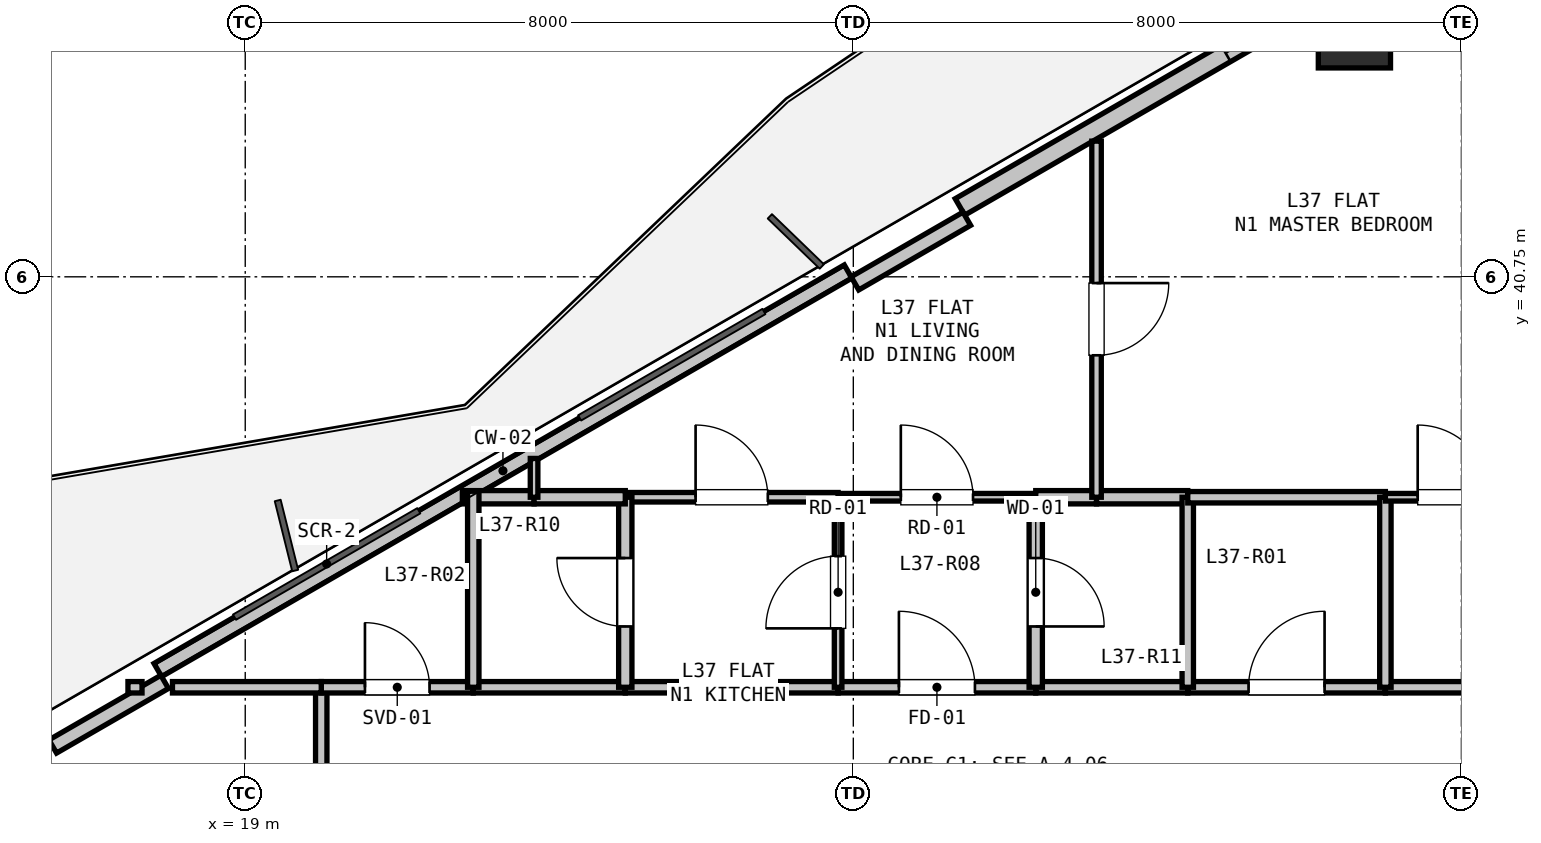
"""IFC4 building model, lengths in metres.
Left out: names, types, materials, properties, quantities, classifications, styles, units other than length and angle.
Written with IfcOpenShell. Run it as: python <this file> out.ifc"""

import sys

from ifc_helpers import new_model, si_unit, direction, frame, frame_2d, origin, origin_2d, place, context, subcontext, project, spatial, rectangle, hollow_rectangle, extrude, element, fill, save


model = new_model("IFC4")
c1 = context("Model", 3, precision=1e-05, world=origin(), true_north=direction((0.0, 1.0)))
c2 = subcontext(c1, "Body", "Model", "MODEL_VIEW")
j1 = project(units=[si_unit("LENGTHUNIT", "METRE"), si_unit("PLANEANGLEUNIT", "RADIAN")], contexts=[c1])
p1 = place(None, origin())
s1 = spatial("IfcSite", under=j1, at=p1, CompositionType="ELEMENT")
p2 = place(p1, origin())
s2 = spatial("IfcBuilding", under=s1, at=p2, CompositionType="ELEMENT")
p3 = place(p2, frame((0.0, 0.0, 134.4)))
s3 = spatial("IfcBuildingStorey", under=s2, at=p3, CompositionType="ELEMENT", Elevation=134.4)
p4 = place(p3, frame((33.593, 43.973, 0.0), z_axis=(0.0, 0.0, 1.0), x_axis=(1.0, 0.0, 0.0)))
e1 = element("IfcColumn", 1, at=p4, inside=s3, PredefinedType="COLUMN", context=c2, shape_type="SweptSolid", body=[
    extrude(hollow_rectangle(XDim=0.95, YDim=0.95, WallThickness=0.028, at=origin_2d()), origin(), (0.0, 0.0, 1.0), 3.3),
])
p5 = place(p3, frame((17.85, 35.577, 0.0), z_axis=(0.0, 0.0, 1.0), x_axis=(0.866026619769, 0.499997893847, 0.0)))
e2 = element("IfcWall", 2, at=p5, inside=s3, PredefinedType="PARAPET", context=c2, shape_type="SweptSolid", body=[
    extrude(rectangle(XDim=10.486, YDim=0.2, at=frame_2d((5.243, 0.0))), origin(), (0.0, 0.0, 1.0), 0.2),
])
p6 = place(p3, frame((28.403, 41.67, 0.0), z_axis=(0.0, 0.0, 1.0), x_axis=(0.86602239209, 0.500005216371, 0.0)))
e3 = element("IfcWall", 3, at=p6, inside=s3, PredefinedType="SOLIDWALL", context=c2, shape_type="SweptSolid", body=[
    extrude(rectangle(XDim=11.186, YDim=0.25, at=frame_2d((5.593, 0.0))), origin(), (0.0, 0.0, 1.0), 2.68),
])
p7 = place(p6, frame((4.039, 0.0, 0.9)))
e4 = element("IfcOpeningElement", 4, at=p7, cuts=e3, PredefinedType="OPENING", context=c2, shape_type="SweptSolid", body=[
    extrude(rectangle(XDim=1.2, YDim=1.4, at=frame_2d((0.6, 0.7))), frame((0.0, 0.135, 0.0), z_axis=(0.0, -1.0, 0.0), x_axis=(1.0, 0.0, 0.0)), (0.0, 0.0, 1.0), 0.27),
])
for number, where, z_axis, x_axis in (
    (5, (16.468, 34.571, 0.0), (0.0, 0.0, 1.0), (0.866, 0.5, 0.0)),
    (6, (27.021, 40.664, 0.0), (0.0, 0.0, 1.0), (0.866, 0.5, 0.0)),
):
    element("IfcWall", number, at=place(p3, frame(where, z_axis=z_axis, x_axis=x_axis)), inside=s3, PredefinedType="PARAPET", context=c2, shape_type="SweptSolid", body=[
        extrude(rectangle(XDim=1.7, YDim=0.2, at=frame_2d((0.85, 0.0))), origin(), (0.0, 0.0, 1.0), 2.68),
    ])
p8 = place(p3, frame((20.0, 32.75, 0.0), z_axis=(0.0, 0.0, 1.0), x_axis=(0.0, 1.0, 0.0)))
e7 = element("IfcWall", 7, at=p8, inside=s3, PredefinedType="PARTITIONING", context=c2, shape_type="SweptSolid", body=[
    extrude(rectangle(XDim=2.6, YDim=0.15, at=frame_2d((1.3, 0.0))), origin(), (0.0, 0.0, 1.0), 2.433),
])
p9 = place(p3, frame((20.0, 35.35, 0.0), z_axis=(0.0, 0.0, 1.0), x_axis=(1.0, 0.0, 0.0)))
e8 = element("IfcWall", 8, at=p9, inside=s3, PredefinedType="PARTITIONING", context=c2, shape_type="SweptSolid", body=[
    extrude(rectangle(XDim=2.0, YDim=0.15, at=frame_2d((1.0, 0.0))), origin(), (0.0, 0.0, 1.0), 3.06),
])
p10 = place(p9, frame((0.575, 0.0, 0.0)))
e9 = element("IfcOpeningElement", 9, at=p10, cuts=e8, PredefinedType="OPENING", context=c2, shape_type="SweptSolid", body=[
    extrude(rectangle(XDim=0.85, YDim=2.1, at=frame_2d((0.425, 1.05))), frame((0.0, 0.085, 0.0), z_axis=(0.0, -1.0, 0.0), x_axis=(1.0, 0.0, 0.0)), (0.0, 0.0, 1.0), 0.17),
])
p11 = place(p3, frame((22.0, 35.35, 0.0), z_axis=(0.0, 0.0, 1.0), x_axis=(1.0, 0.0, 0.0)))
e10 = element("IfcWall", 10, at=p11, inside=s3, PredefinedType="PARTITIONING", context=c2, shape_type="SweptSolid", body=[
    extrude(rectangle(XDim=2.0, YDim=0.15, at=frame_2d((1.0, 0.0))), origin(), (0.0, 0.0, 1.0), 3.06),
])
p12 = place(p3, frame((24.0, 35.35, 0.0), z_axis=(0.0, 0.0, 1.0), x_axis=(1.0, 0.0, 0.0)))
e11 = element("IfcWall", 11, at=p12, inside=s3, PredefinedType="PARTITIONING", context=c2, shape_type="SweptSolid", body=[
    extrude(rectangle(XDim=2.8, YDim=0.15, at=frame_2d((1.4, 0.0))), origin(), (0.0, 0.0, 1.0), 3.06),
])
p13 = place(p3, frame((26.8, 35.35, 0.0), z_axis=(0.0, 0.0, 1.0), x_axis=(1.0, 0.0, 0.0)))
e12 = element("IfcWall", 12, at=p13, inside=s3, PredefinedType="PARTITIONING", context=c2, shape_type="SweptSolid", body=[
    extrude(rectangle(XDim=2.6, YDim=0.15, at=frame_2d((1.3, 0.0))), origin(), (0.0, 0.0, 1.0), 3.06),
])
p14 = place(p13, frame((0.8, 0.0, 0.0)))
e13 = element("IfcOpeningElement", 13, at=p14, cuts=e12, PredefinedType="OPENING", context=c2, shape_type="SweptSolid", body=[
    extrude(rectangle(XDim=1.0, YDim=2.15, at=frame_2d((0.5, 1.075))), frame((0.0, 0.085, 0.0), z_axis=(0.0, -1.0, 0.0), x_axis=(1.0, 0.0, 0.0)), (0.0, 0.0, 1.0), 0.17),
])
p15 = place(p3, frame((29.4, 35.35, 0.0), z_axis=(0.0, 0.0, 1.0), x_axis=(1.0, 0.0, 0.0)))
e14 = element("IfcWall", 14, at=p15, inside=s3, PredefinedType="PARTITIONING", context=c2, shape_type="SweptSolid", body=[
    extrude(rectangle(XDim=2.0, YDim=0.15, at=frame_2d((1.0, 0.0))), origin(), (0.0, 0.0, 1.0), 3.06),
])
p16 = place(p3, frame((31.4, 35.35, 0.0), z_axis=(0.0, 0.0, 1.0), x_axis=(1.0, 0.0, 0.0)))
e15 = element("IfcWall", 15, at=p16, inside=s3, PredefinedType="PARTITIONING", context=c2, shape_type="SweptSolid", body=[
    extrude(rectangle(XDim=2.6, YDim=0.15, at=frame_2d((1.3, 0.0))), origin(), (0.0, 0.0, 1.0), 3.06),
])
p17 = place(p16, frame((0.8, 0.0, 0.0)))
e16 = element("IfcOpeningElement", 16, at=p17, cuts=e15, PredefinedType="OPENING", context=c2, shape_type="SweptSolid", body=[
    extrude(rectangle(XDim=1.0, YDim=2.15, at=frame_2d((0.5, 1.075))), frame((0.0, 0.085, 0.0), z_axis=(0.0, -1.0, 0.0), x_axis=(1.0, 0.0, 0.0)), (0.0, 0.0, 1.0), 0.17),
])
p18 = place(p3, frame((34.0, 35.35, 0.0), z_axis=(0.0, 0.0, 1.0), x_axis=(1.0, 0.0, 0.0)))
e17 = element("IfcWall", 17, at=p18, inside=s3, PredefinedType="PARTITIONING", context=c2, shape_type="SweptSolid", body=[
    extrude(rectangle(XDim=5.2, YDim=0.15, at=frame_2d((2.6, 0.0))), origin(), (0.0, 0.0, 1.0), 2.433),
])
p19 = place(p3, frame((26.8, 37.85, 0.0), z_axis=(0.0, 0.0, 1.0), x_axis=(1.0, 0.0, 0.0)))
e18 = element("IfcWall", 18, at=p19, inside=s3, PredefinedType="PARTITIONING", context=c2, shape_type="SweptSolid", body=[
    extrude(rectangle(XDim=2.6, YDim=0.1, at=frame_2d((1.3, 0.0))), origin(), (0.0, 0.0, 1.0), 3.06),
])
p20 = place(p19, frame((0.825, 0.0, 0.0)))
e19 = element("IfcOpeningElement", 19, at=p20, cuts=e18, PredefinedType="OPENING", context=c2, shape_type="SweptSolid", body=[
    extrude(rectangle(XDim=0.95, YDim=2.1, at=frame_2d((0.475, 1.05))), frame((0.0, 0.06, 0.0), z_axis=(0.0, -1.0, 0.0), x_axis=(1.0, 0.0, 0.0)), (0.0, 0.0, 1.0), 0.12),
])
p21 = place(p3, frame((29.4, 37.85, 0.0), z_axis=(0.0, 0.0, 1.0), x_axis=(0.0, -1.0, 0.0)))
e20 = element("IfcWall", 20, at=p21, inside=s3, PredefinedType="PLUMBINGWALL", context=c2, shape_type="SweptSolid", body=[
    extrude(rectangle(XDim=2.5, YDim=0.175, at=frame_2d((1.25, 0.0))), origin(), (0.0, 0.0, 1.0), 3.06),
])
p22 = place(p21, frame((0.8, 0.0, 0.0)))
e21 = element("IfcOpeningElement", 21, at=p22, cuts=e20, PredefinedType="OPENING", context=c2, shape_type="SweptSolid", body=[
    extrude(rectangle(XDim=0.9, YDim=2.1, at=frame_2d((0.45, 1.05))), frame((0.0, 0.097, 0.0), z_axis=(0.0, -1.0, 0.0), x_axis=(1.0, 0.0, 0.0)), (0.0, 0.0, 1.0), 0.195),
])
p23 = place(p3, frame((26.8, 35.35, 0.0), z_axis=(0.0, 0.0, 1.0), x_axis=(0.0, 1.0, 0.0)))
e22 = element("IfcWall", 22, at=p23, inside=s3, PredefinedType="PARTITIONING", context=c2, shape_type="SweptSolid", body=[
    extrude(rectangle(XDim=2.5, YDim=0.1, at=frame_2d((1.25, 0.0))), origin(), (0.0, 0.0, 1.0), 3.06),
])
p24 = place(p23, frame((0.775, 0.0, 0.0)))
e23 = element("IfcOpeningElement", 23, at=p24, cuts=e22, PredefinedType="OPENING", context=c2, shape_type="SweptSolid", body=[
    extrude(rectangle(XDim=0.95, YDim=2.1, at=frame_2d((0.475, 1.05))), frame((0.0, 0.06, 0.0), z_axis=(0.0, -1.0, 0.0), x_axis=(1.0, 0.0, 0.0)), (0.0, 0.0, 1.0), 0.12),
])
p25 = place(p3, frame((24.0, 37.85, 0.0), z_axis=(0.0, 0.0, 1.0), x_axis=(1.0, 0.0, 0.0)))
e24 = element("IfcWall", 24, at=p25, inside=s3, PredefinedType="PARTITIONING", context=c2, shape_type="SweptSolid", body=[
    extrude(rectangle(XDim=2.8, YDim=0.125, at=frame_2d((1.4, 0.0))), origin(), (0.0, 0.0, 1.0), 3.06),
])
p26 = place(p25, frame((0.925, 0.0, 0.0)))
e25 = element("IfcOpeningElement", 25, at=p26, cuts=e24, PredefinedType="OPENING", context=c2, shape_type="SweptSolid", body=[
    extrude(rectangle(XDim=0.95, YDim=2.1, at=frame_2d((0.475, 1.05))), frame((0.0, 0.073, 0.0), z_axis=(0.0, -1.0, 0.0), x_axis=(1.0, 0.0, 0.0)), (0.0, 0.0, 1.0), 0.145),
])
p27 = place(p3, frame((24.0, 35.35, 0.0), z_axis=(0.0, 0.0, 1.0), x_axis=(0.0, 1.0, 0.0)))
e26 = element("IfcWall", 26, at=p27, inside=s3, PredefinedType="PLUMBINGWALL", context=c2, shape_type="SweptSolid", body=[
    extrude(rectangle(XDim=2.5, YDim=0.175, at=frame_2d((1.25, 0.0))), origin(), (0.0, 0.0, 1.0), 3.06),
])
p28 = place(p27, frame((0.8, 0.0, 0.0)))
e27 = element("IfcOpeningElement", 27, at=p28, cuts=e26, PredefinedType="OPENING", context=c2, shape_type="SweptSolid", body=[
    extrude(rectangle(XDim=0.9, YDim=2.1, at=frame_2d((0.45, 1.05))), frame((0.0, 0.097, 0.0), z_axis=(0.0, -1.0, 0.0), x_axis=(1.0, 0.0, 0.0)), (0.0, 0.0, 1.0), 0.195),
])
p29 = place(p3, frame((21.856, 37.85, 0.0), z_axis=(0.0, 0.0, 1.0), x_axis=(1.0, 0.0, 0.0)))
e28 = element("IfcWall", 28, at=p29, inside=s3, PredefinedType="PLUMBINGWALL", context=c2, shape_type="SweptSolid", body=[
    extrude(rectangle(XDim=0.944, YDim=0.175, at=frame_2d((0.472, 0.0))), origin(), (0.0, 0.0, 1.0), 2.365),
])
p30 = place(p3, frame((22.8, 37.85, 0.0), z_axis=(0.0, 0.0, 1.0), x_axis=(1.0, 0.0, 0.0)))
e29 = element("IfcWall", 29, at=p30, inside=s3, PredefinedType="PLUMBINGWALL", context=c2, shape_type="SweptSolid", body=[
    extrude(rectangle(XDim=1.2, YDim=0.175, at=frame_2d((0.6, 0.0))), origin(), (0.0, 0.0, 1.0), 2.365),
])
p31 = place(p3, frame((22.0, 35.35, 0.0), z_axis=(0.0, 0.0, 1.0), x_axis=(0.0, 1.0, 0.0)))
e30 = element("IfcWall", 30, at=p31, inside=s3, PredefinedType="PARTITIONING", context=c2, shape_type="SweptSolid", body=[
    extrude(rectangle(XDim=2.579, YDim=0.15, at=frame_2d((1.29, 0.0))), origin(), (0.0, 0.0, 1.0), 2.365),
])
p32 = place(p3, frame((29.4, 37.85, 0.0), z_axis=(0.0, 0.0, 1.0), x_axis=(1.0, 0.0, 0.0)))
e31 = element("IfcWall", 31, at=p32, inside=s3, PredefinedType="PLUMBINGWALL", context=c2, shape_type="SweptSolid", body=[
    extrude(rectangle(XDim=0.8, YDim=0.175, at=frame_2d((0.4, 0.0))), origin(), (0.0, 0.0, 1.0), 3.06),
])
p33 = place(p3, frame((30.2, 37.85, 0.0), z_axis=(0.0, 0.0, 1.0), x_axis=(1.0, 0.0, 0.0)))
e32 = element("IfcWall", 32, at=p33, inside=s3, PredefinedType="PLUMBINGWALL", context=c2, shape_type="SweptSolid", body=[
    extrude(rectangle(XDim=1.2, YDim=0.175, at=frame_2d((0.6, 0.0))), origin(), (0.0, 0.0, 1.0), 3.06),
])
p34 = place(p3, frame((31.4, 37.85, 0.0), z_axis=(0.0, 0.0, 1.0), x_axis=(0.0, -1.0, 0.0)))
e33 = element("IfcWall", 33, at=p34, inside=s3, PredefinedType="PARTITIONING", context=c2, shape_type="SweptSolid", body=[
    extrude(rectangle(XDim=2.5, YDim=0.15, at=frame_2d((1.25, 0.0))), origin(), (0.0, 0.0, 1.0), 3.06),
])
p35 = place(p3, frame((31.4, 37.85, 0.0), z_axis=(0.0, 0.0, 1.0), x_axis=(1.0, 0.0, 0.0)))
e34 = element("IfcWall", 34, at=p35, inside=s3, PredefinedType="PARTITIONING", context=c2, shape_type="SweptSolid", body=[
    extrude(rectangle(XDim=2.6, YDim=0.15, at=frame_2d((1.3, 0.0))), origin(), (0.0, 0.0, 1.0), 3.06),
])
p36 = place(p3, frame((34.0, 37.85, 0.0), z_axis=(0.0, 0.0, 1.0), x_axis=(0.0, -1.0, 0.0)))
e35 = element("IfcWall", 35, at=p36, inside=s3, PredefinedType="PARTITIONING", context=c2, shape_type="SweptSolid", body=[
    extrude(rectangle(XDim=2.5, YDim=0.15, at=frame_2d((1.25, 0.0))), origin(), (0.0, 0.0, 1.0), 3.06),
])
p37 = place(p3, frame((20.0, 35.35, 0.0), z_axis=(0.0, 0.0, 1.0), x_axis=(-1.0, 0.0, 0.0)))
e36 = element("IfcWall", 36, at=p37, inside=s3, PredefinedType="PARTITIONING", context=c2, shape_type="SweptSolid", body=[
    extrude(rectangle(XDim=1.958, YDim=0.15, at=frame_2d((0.979, 0.0))), origin(), (0.0, 0.0, 1.0), 2.365),
])
p38 = place(p3, frame((17.642, 35.35, 0.0), z_axis=(0.0, 0.0, 1.0), x_axis=(-1.0, 0.0, 0.0)))
e37 = element("IfcWall", 37, at=p38, inside=s3, PredefinedType="PARTITIONING", context=c2, shape_type="SweptSolid", body=[
    extrude(rectangle(XDim=0.185, YDim=0.15, at=frame_2d((0.093, 0.0))), origin(), (0.0, 0.0, 1.0), 3.06),
])
p39 = place(p3, frame((34.0, 37.85, 0.0), z_axis=(0.0, 0.0, 1.0), x_axis=(1.0, 0.0, 0.0)))
e38 = element("IfcWall", 38, at=p39, inside=s3, PredefinedType="PARTITIONING", context=c2, shape_type="SweptSolid", body=[
    extrude(rectangle(XDim=1.8, YDim=0.1, at=frame_2d((0.9, 0.0))), origin(), (0.0, 0.0, 1.0), 3.06),
])
p40 = place(p39, frame((0.425, 0.0, 0.0)))
e39 = element("IfcOpeningElement", 39, at=p40, cuts=e38, PredefinedType="OPENING", context=c2, shape_type="SweptSolid", body=[
    extrude(rectangle(XDim=0.95, YDim=2.1, at=frame_2d((0.475, 1.05))), frame((0.0, 0.06, 0.0), z_axis=(0.0, -1.0, 0.0), x_axis=(1.0, 0.0, 0.0)), (0.0, 0.0, 1.0), 0.12),
])
p41 = place(p3, frame((22.8, 37.85, 0.0), z_axis=(0.0, 0.0, 1.0), x_axis=(0.0, 1.0, 0.0)))
e40 = element("IfcWall", 40, at=p41, inside=s3, PredefinedType="PARTITIONING", context=c2, shape_type="SweptSolid", body=[
    extrude(rectangle(XDim=0.51, YDim=0.1, at=frame_2d((0.255, 0.0))), origin(), (0.0, 0.0, 1.0), 2.725),
])
p42 = place(p3, frame((30.2, 42.535, 0.0), z_axis=(0.0, 0.0, 1.0), x_axis=(0.0, -1.0, 0.0)))
e41 = element("IfcWall", 41, at=p42, inside=s3, PredefinedType="PARTITIONING", context=c2, shape_type="SweptSolid", body=[
    extrude(rectangle(XDim=4.685, YDim=0.125, at=frame_2d((2.342, 0.0))), origin(), (0.0, 0.0, 1.0), 2.365),
])
p43 = place(p42, frame((1.867, 0.0, 0.0)))
e42 = element("IfcOpeningElement", 42, at=p43, cuts=e41, PredefinedType="OPENING", context=c2, shape_type="SweptSolid", body=[
    extrude(rectangle(XDim=0.95, YDim=2.1, at=frame_2d((0.475, 1.05))), frame((0.0, 0.073, 0.0), z_axis=(0.0, -1.0, 0.0), x_axis=(1.0, 0.0, 0.0)), (0.0, 0.0, 1.0), 0.145),
])
p44 = place(p7, origin())
e43 = element("IfcWindow", 43, at=p44, inside=s3, PartitioningType="SINGLE_PANEL", PredefinedType="WINDOW", context=c2, shape_type="SweptSolid", body=[
    extrude(rectangle(XDim=1.2, YDim=1.4, at=frame_2d((0.6, 0.7))), frame((0.0, 0.03, 0.0), z_axis=(0.0, -1.0, 0.0), x_axis=(1.0, 0.0, 0.0)), (0.0, 0.0, 1.0), 0.06),
])
fill(e4, e43)
p45 = place(p14, origin())
e44 = element("IfcDoor", 44, at=p45, inside=s3, OperationType="SINGLE_SWING_LEFT", PredefinedType="DOOR", context=c2, shape_type="SweptSolid", body=[
    extrude(rectangle(XDim=1.0, YDim=2.15, at=frame_2d((0.5, 1.075))), frame((0.0, 0.025, 0.0), z_axis=(0.0, -1.0, 0.0), x_axis=(1.0, 0.0, 0.0)), (0.0, 0.0, 1.0), 0.05),
])
fill(e13, e44)
p46 = place(p17, origin())
e45 = element("IfcDoor", 45, at=p46, inside=s3, OperationType="SINGLE_SWING_RIGHT", PredefinedType="DOOR", context=c2, shape_type="SweptSolid", body=[
    extrude(rectangle(XDim=1.0, YDim=2.15, at=frame_2d((0.5, 1.075))), frame((0.0, 0.025, 0.0), z_axis=(0.0, -1.0, 0.0), x_axis=(1.0, 0.0, 0.0)), (0.0, 0.0, 1.0), 0.05),
])
fill(e16, e45)
p47 = place(p10, origin())
e46 = element("IfcDoor", 46, at=p47, inside=s3, OperationType="SINGLE_SWING_LEFT", PredefinedType="DOOR", context=c2, shape_type="SweptSolid", body=[
    extrude(rectangle(XDim=0.85, YDim=2.1, at=frame_2d((0.425, 1.05))), frame((0.0, 0.025, 0.0), z_axis=(0.0, -1.0, 0.0), x_axis=(1.0, 0.0, 0.0)), (0.0, 0.0, 1.0), 0.05),
])
fill(e9, e46)
p48 = place(p24, origin())
e47 = element("IfcDoor", 47, at=p48, inside=s3, OperationType="SINGLE_SWING_LEFT", PredefinedType="DOOR", context=c2, shape_type="SweptSolid", body=[
    extrude(rectangle(XDim=0.95, YDim=2.1, at=frame_2d((0.475, 1.05))), frame((0.0, 0.025, 0.0), z_axis=(0.0, -1.0, 0.0), x_axis=(1.0, 0.0, 0.0)), (0.0, 0.0, 1.0), 0.05),
])
fill(e23, e47)
p49 = place(p22, origin())
e48 = element("IfcDoor", 48, at=p49, inside=s3, OperationType="SINGLE_SWING_RIGHT", PredefinedType="DOOR", context=c2, shape_type="SweptSolid", body=[
    extrude(rectangle(XDim=0.9, YDim=2.1, at=frame_2d((0.45, 1.05))), frame((0.0, 0.025, 0.0), z_axis=(0.0, -1.0, 0.0), x_axis=(1.0, 0.0, 0.0)), (0.0, 0.0, 1.0), 0.05),
])
fill(e21, e48)
p50 = place(p20, origin())
e49 = element("IfcDoor", 49, at=p50, inside=s3, OperationType="SINGLE_SWING_LEFT", PredefinedType="DOOR", context=c2, shape_type="SweptSolid", body=[
    extrude(rectangle(XDim=0.95, YDim=2.1, at=frame_2d((0.475, 1.05))), frame((0.0, 0.025, 0.0), z_axis=(0.0, -1.0, 0.0), x_axis=(1.0, 0.0, 0.0)), (0.0, 0.0, 1.0), 0.05),
])
fill(e19, e49)
p51 = place(p26, origin())
e50 = element("IfcDoor", 50, at=p51, inside=s3, OperationType="SINGLE_SWING_LEFT", PredefinedType="DOOR", context=c2, shape_type="SweptSolid", body=[
    extrude(rectangle(XDim=0.95, YDim=2.1, at=frame_2d((0.475, 1.05))), frame((0.0, 0.025, 0.0), z_axis=(0.0, -1.0, 0.0), x_axis=(1.0, 0.0, 0.0)), (0.0, 0.0, 1.0), 0.05),
])
fill(e25, e50)
p52 = place(p40, origin())
e51 = element("IfcDoor", 51, at=p52, inside=s3, OperationType="SINGLE_SWING_LEFT", PredefinedType="DOOR", context=c2, shape_type="SweptSolid", body=[
    extrude(rectangle(XDim=0.95, YDim=2.1, at=frame_2d((0.475, 1.05))), frame((0.0, 0.025, 0.0), z_axis=(0.0, -1.0, 0.0), x_axis=(1.0, 0.0, 0.0)), (0.0, 0.0, 1.0), 0.05),
])
fill(e39, e51)
p53 = place(p43, origin())
e52 = element("IfcDoor", 52, at=p53, inside=s3, OperationType="SINGLE_SWING_LEFT", PredefinedType="DOOR", context=c2, shape_type="SweptSolid", body=[
    extrude(rectangle(XDim=0.95, YDim=2.1, at=frame_2d((0.475, 1.05))), frame((0.0, 0.025, 0.0), z_axis=(0.0, -1.0, 0.0), x_axis=(1.0, 0.0, 0.0)), (0.0, 0.0, 1.0), 0.05),
])
fill(e42, e52)
p54 = place(p28, origin())
e53 = element("IfcDoor", 53, at=p54, inside=s3, OperationType="SINGLE_SWING_RIGHT", PredefinedType="DOOR", context=c2, shape_type="SweptSolid", body=[
    extrude(rectangle(XDim=0.9, YDim=2.1, at=frame_2d((0.45, 1.05))), frame((0.0, 0.025, 0.0), z_axis=(0.0, -1.0, 0.0), x_axis=(1.0, 0.0, 0.0)), (0.0, 0.0, 1.0), 0.05),
])
fill(e27, e53)
save(model, sys.argv[1])
